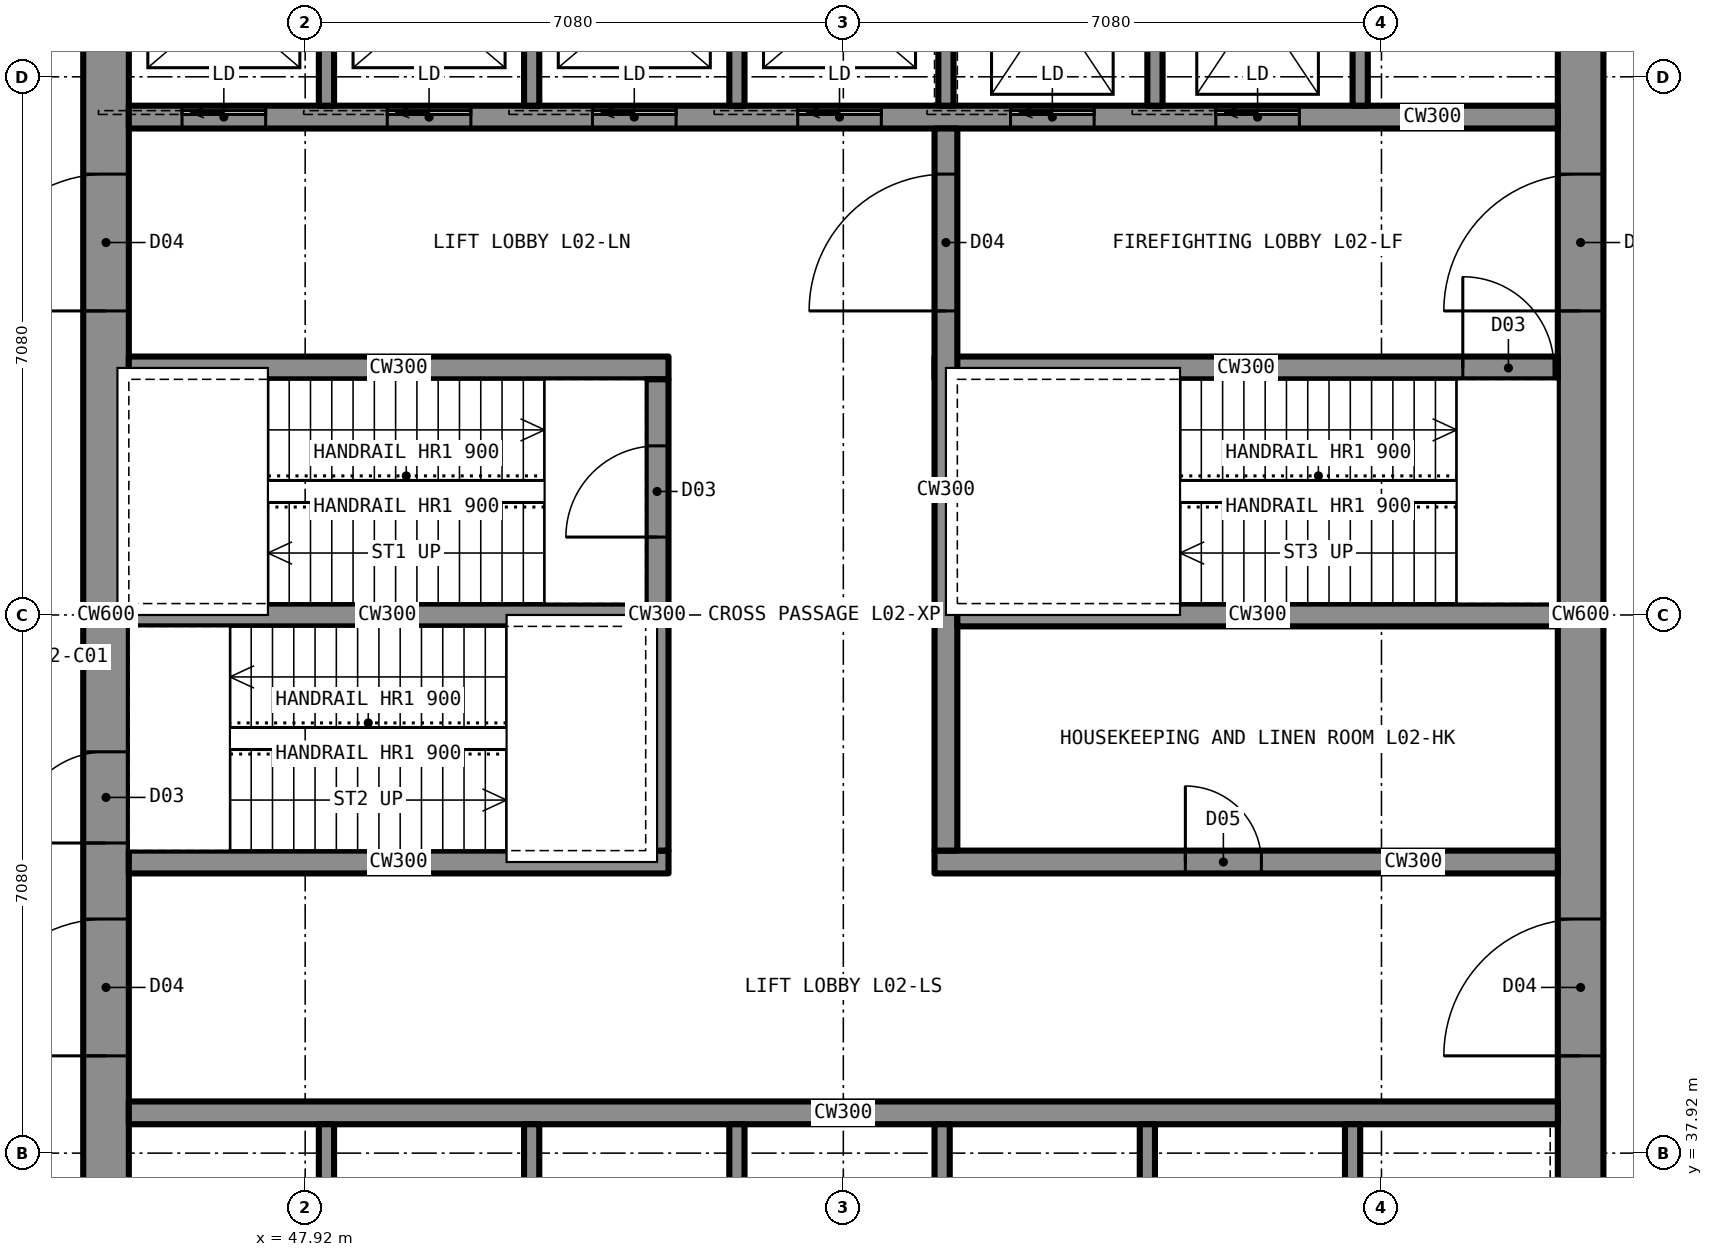
"""IFC4 building model, lengths in metres.
Left out: names, types, materials, properties, quantities, classifications, styles, units other than length and angle.
Written with IfcOpenShell. Run it as: python <this file> out.ifc"""

import sys

from ifc_helpers import new_model, si_unit, direction, frame, frame_2d, origin, place, context, subcontext, project, spatial, rectangle, extrude, element, fill, save


model = new_model("IFC4")
c1 = context("Model", 3, precision=1e-05, world=origin(), true_north=direction((0.0, 1.0)))
c2 = subcontext(c1, "Body", "Model", "MODEL_VIEW")
j1 = project(units=[si_unit("LENGTHUNIT", "METRE"), si_unit("PLANEANGLEUNIT", "RADIAN")], contexts=[c1])
p1 = place(None, origin())
s1 = spatial("IfcSite", under=j1, at=p1, CompositionType="ELEMENT")
p2 = place(p1, origin())
s2 = spatial("IfcBuilding", under=s1, at=p2, CompositionType="ELEMENT")
p3 = place(p2, frame((0.0, 0.0, 11.0)))
s3 = spatial("IfcBuildingStorey", under=s2, at=p3, CompositionType="ELEMENT", Elevation=11.0)
p4 = place(p3, frame((64.7, 35.6, 0.0), z_axis=(0.0, 0.0, 1.0), x_axis=(0.0, 1.0, 0.0)))
e1 = element("IfcWall", 1, at=p4, inside=s3, PredefinedType="SHEAR", context=c2, shape_type="SweptSolid", body=[
    extrude(rectangle(XDim=18.8, YDim=0.6, at=frame_2d((9.4, 0.0))), origin(), (0.0, 0.0, 1.0), 5.0),
])
p5 = place(p4, frame((13.4, 0.0, 0.0)))
e2 = element("IfcOpeningElement", 2, at=p5, cuts=e1, PredefinedType="OPENING", context=c2, shape_type="SweptSolid", body=[
    extrude(rectangle(XDim=1.8, YDim=2.2, at=frame_2d((0.9, 1.1))), frame((0.0, 0.31, 0.0), z_axis=(0.0, -1.0, 0.0), x_axis=(1.0, 0.0, 0.0)), (0.0, 0.0, 1.0), 0.62),
])
p6 = place(p4, frame((3.6, 0.0, 0.0)))
e3 = element("IfcOpeningElement", 3, at=p6, cuts=e1, PredefinedType="OPENING", context=c2, shape_type="SweptSolid", body=[
    extrude(rectangle(XDim=1.8, YDim=2.2, at=frame_2d((0.9, 1.1))), frame((0.0, 0.31, 0.0), z_axis=(0.0, -1.0, 0.0), x_axis=(1.0, 0.0, 0.0)), (0.0, 0.0, 1.0), 0.62),
])
p7 = place(p3, frame((45.3, 35.6, 0.0), z_axis=(0.0, 0.0, 1.0), x_axis=(0.0, 1.0, 0.0)))
e4 = element("IfcWall", 4, at=p7, inside=s3, PredefinedType="SHEAR", context=c2, shape_type="SweptSolid", body=[
    extrude(rectangle(XDim=18.8, YDim=0.6, at=frame_2d((9.4, 0.0))), origin(), (0.0, 0.0, 1.0), 5.0),
])
p8 = place(p7, frame((13.4, 0.0, 0.0)))
e5 = element("IfcOpeningElement", 5, at=p8, cuts=e4, PredefinedType="OPENING", context=c2, shape_type="SweptSolid", body=[
    extrude(rectangle(XDim=1.8, YDim=2.2, at=frame_2d((0.9, 1.1))), frame((0.0, 0.31, 0.0), z_axis=(0.0, -1.0, 0.0), x_axis=(1.0, 0.0, 0.0)), (0.0, 0.0, 1.0), 0.62),
])
p9 = place(p7, frame((3.6, 0.0, 0.0)))
e6 = element("IfcOpeningElement", 6, at=p9, cuts=e4, PredefinedType="OPENING", context=c2, shape_type="SweptSolid", body=[
    extrude(rectangle(XDim=1.8, YDim=2.2, at=frame_2d((0.9, 1.1))), frame((0.0, 0.31, 0.0), z_axis=(0.0, -1.0, 0.0), x_axis=(1.0, 0.0, 0.0)), (0.0, 0.0, 1.0), 0.62),
])
p10 = place(p7, frame((6.4, 0.0, 0.0)))
e7 = element("IfcOpeningElement", 7, at=p10, cuts=e4, PredefinedType="OPENING", context=c2, shape_type="SweptSolid", body=[
    extrude(rectangle(XDim=1.2, YDim=2.2, at=frame_2d((0.6, 1.1))), frame((0.0, 0.31, 0.0), z_axis=(0.0, -1.0, 0.0), x_axis=(1.0, 0.0, 0.0)), (0.0, 0.0, 1.0), 0.62),
])
p11 = place(p3, frame((45.6, 51.55, 0.0), z_axis=(0.0, 0.0, 1.0), x_axis=(1.0, 0.0, 0.0)))
e8 = element("IfcWall", 8, at=p11, inside=s3, PredefinedType="SHEAR", context=c2, shape_type="SweptSolid", body=[
    extrude(rectangle(XDim=18.8, YDim=0.3, at=frame_2d((9.4, 0.0))), origin(), (0.0, 0.0, 1.0), 5.0),
])
p12 = place(p11, frame((0.7, 0.0, 0.0)))
e9 = element("IfcOpeningElement", 9, at=p12, cuts=e8, PredefinedType="OPENING", context=c2, shape_type="SweptSolid", body=[
    extrude(rectangle(XDim=1.1, YDim=2.2, at=frame_2d((0.55, 1.1))), frame((0.0, 0.16, 0.0), z_axis=(0.0, -1.0, 0.0), x_axis=(1.0, 0.0, 0.0)), (0.0, 0.0, 1.0), 0.32),
])
p13 = place(p11, frame((3.4, 0.0, 0.0)))
e10 = element("IfcOpeningElement", 10, at=p13, cuts=e8, PredefinedType="OPENING", context=c2, shape_type="SweptSolid", body=[
    extrude(rectangle(XDim=1.1, YDim=2.2, at=frame_2d((0.55, 1.1))), frame((0.0, 0.16, 0.0), z_axis=(0.0, -1.0, 0.0), x_axis=(1.0, 0.0, 0.0)), (0.0, 0.0, 1.0), 0.32),
])
p14 = place(p11, frame((6.1, 0.0, 0.0)))
e11 = element("IfcOpeningElement", 11, at=p14, cuts=e8, PredefinedType="OPENING", context=c2, shape_type="SweptSolid", body=[
    extrude(rectangle(XDim=1.1, YDim=2.2, at=frame_2d((0.55, 1.1))), frame((0.0, 0.16, 0.0), z_axis=(0.0, -1.0, 0.0), x_axis=(1.0, 0.0, 0.0)), (0.0, 0.0, 1.0), 0.32),
])
p15 = place(p11, frame((8.8, 0.0, 0.0)))
e12 = element("IfcOpeningElement", 12, at=p15, cuts=e8, PredefinedType="OPENING", context=c2, shape_type="SweptSolid", body=[
    extrude(rectangle(XDim=1.1, YDim=2.2, at=frame_2d((0.55, 1.1))), frame((0.0, 0.16, 0.0), z_axis=(0.0, -1.0, 0.0), x_axis=(1.0, 0.0, 0.0)), (0.0, 0.0, 1.0), 0.32),
])
p16 = place(p11, frame((11.6, 0.0, 0.0)))
e13 = element("IfcOpeningElement", 13, at=p16, cuts=e8, PredefinedType="OPENING", context=c2, shape_type="SweptSolid", body=[
    extrude(rectangle(XDim=1.1, YDim=2.2, at=frame_2d((0.55, 1.1))), frame((0.0, 0.16, 0.0), z_axis=(0.0, -1.0, 0.0), x_axis=(1.0, 0.0, 0.0)), (0.0, 0.0, 1.0), 0.32),
])
p17 = place(p11, frame((14.3, 0.0, 0.0)))
e14 = element("IfcOpeningElement", 14, at=p17, cuts=e8, PredefinedType="OPENING", context=c2, shape_type="SweptSolid", body=[
    extrude(rectangle(XDim=1.1, YDim=2.2, at=frame_2d((0.55, 1.1))), frame((0.0, 0.16, 0.0), z_axis=(0.0, -1.0, 0.0), x_axis=(1.0, 0.0, 0.0)), (0.0, 0.0, 1.0), 0.32),
])
p18 = place(p3, frame((45.6, 38.45, 0.0), z_axis=(0.0, 0.0, 1.0), x_axis=(1.0, 0.0, 0.0)))
e15 = element("IfcWall", 15, at=p18, inside=s3, PredefinedType="SHEAR", context=c2, shape_type="SweptSolid", body=[
    extrude(rectangle(XDim=18.8, YDim=0.3, at=frame_2d((9.4, 0.0))), origin(), (0.0, 0.0, 1.0), 5.0),
])
p19 = place(p3, frame((45.6, 48.25, 0.0), z_axis=(0.0, 0.0, 1.0), x_axis=(1.0, 0.0, 0.0)))
e16 = element("IfcWall", 16, at=p19, inside=s3, PredefinedType="SHEAR", context=c2, shape_type="SweptSolid", body=[
    extrude(rectangle(XDim=7.1, YDim=0.3, at=frame_2d((3.55, 0.0))), origin(), (0.0, 0.0, 1.0), 5.0),
])
p20 = place(p3, frame((56.2, 48.25, 0.0), z_axis=(0.0, 0.0, 1.0), x_axis=(1.0, 0.0, 0.0)))
e17 = element("IfcWall", 17, at=p20, inside=s3, PredefinedType="SHEAR", context=c2, shape_type="SweptSolid", body=[
    extrude(rectangle(XDim=8.2, YDim=0.3, at=frame_2d((4.1, 0.0))), origin(), (0.0, 0.0, 1.0), 5.0),
])
p21 = place(p20, frame((6.95, 0.0, 0.0)))
e18 = element("IfcOpeningElement", 18, at=p21, cuts=e17, PredefinedType="OPENING", context=c2, shape_type="SweptSolid", body=[
    extrude(rectangle(XDim=1.2, YDim=2.2, at=frame_2d((0.6, 1.1))), frame((0.0, 0.16, 0.0), z_axis=(0.0, -1.0, 0.0), x_axis=(1.0, 0.0, 0.0)), (0.0, 0.0, 1.0), 0.32),
])
p22 = place(p3, frame((45.6, 41.75, 0.0), z_axis=(0.0, 0.0, 1.0), x_axis=(1.0, 0.0, 0.0)))
e19 = element("IfcWall", 19, at=p22, inside=s3, PredefinedType="SHEAR", context=c2, shape_type="SweptSolid", body=[
    extrude(rectangle(XDim=7.1, YDim=0.3, at=frame_2d((3.55, 0.0))), origin(), (0.0, 0.0, 1.0), 5.0),
])
p23 = place(p3, frame((56.2, 41.75, 0.0), z_axis=(0.0, 0.0, 1.0), x_axis=(1.0, 0.0, 0.0)))
e20 = element("IfcWall", 20, at=p23, inside=s3, PredefinedType="SHEAR", context=c2, shape_type="SweptSolid", body=[
    extrude(rectangle(XDim=8.2, YDim=0.3, at=frame_2d((4.1, 0.0))), origin(), (0.0, 0.0, 1.0), 5.0),
])
p24 = place(p23, frame((3.3, 0.0, 0.0)))
e21 = element("IfcOpeningElement", 21, at=p24, cuts=e20, PredefinedType="OPENING", context=c2, shape_type="SweptSolid", body=[
    extrude(rectangle(XDim=1.0, YDim=2.1, at=frame_2d((0.5, 1.05))), frame((0.0, 0.16, 0.0), z_axis=(0.0, -1.0, 0.0), x_axis=(1.0, 0.0, 0.0)), (0.0, 0.0, 1.0), 0.32),
])
p25 = place(p3, frame((52.55, 41.9, 0.0), z_axis=(0.0, 0.0, 1.0), x_axis=(0.0, 1.0, 0.0)))
e22 = element("IfcWall", 22, at=p25, inside=s3, PredefinedType="SHEAR", context=c2, shape_type="SweptSolid", body=[
    extrude(rectangle(XDim=6.2, YDim=0.3, at=frame_2d((3.1, 0.0))), origin(), (0.0, 0.0, 1.0), 5.0),
])
p26 = place(p25, frame((4.125, 0.0, 0.0)))
e23 = element("IfcOpeningElement", 23, at=p26, cuts=e22, PredefinedType="OPENING", context=c2, shape_type="SweptSolid", body=[
    extrude(rectangle(XDim=1.2, YDim=2.2, at=frame_2d((0.6, 1.1))), frame((0.0, 0.16, 0.0), z_axis=(0.0, -1.0, 0.0), x_axis=(1.0, 0.0, 0.0)), (0.0, 0.0, 1.0), 0.32),
])
p27 = place(p3, frame((56.35, 41.9, 0.0), z_axis=(0.0, 0.0, 1.0), x_axis=(0.0, 1.0, 0.0)))
e24 = element("IfcWall", 24, at=p27, inside=s3, PredefinedType="SHEAR", context=c2, shape_type="SweptSolid", body=[
    extrude(rectangle(XDim=9.5, YDim=0.3, at=frame_2d((4.75, 0.0))), origin(), (0.0, 0.0, 1.0), 5.0),
])
p28 = place(p27, frame((7.1, 0.0, 0.0)))
e25 = element("IfcOpeningElement", 25, at=p28, cuts=e24, PredefinedType="OPENING", context=c2, shape_type="SweptSolid", body=[
    extrude(rectangle(XDim=1.8, YDim=2.2, at=frame_2d((0.9, 1.1))), frame((0.0, 0.16, 0.0), z_axis=(0.0, -1.0, 0.0), x_axis=(1.0, 0.0, 0.0)), (0.0, 0.0, 1.0), 0.32),
])
p29 = place(p3, frame((45.6, 45.0, 0.0), z_axis=(0.0, 0.0, 1.0), x_axis=(1.0, 0.0, 0.0)))
e26 = element("IfcWall", 26, at=p29, inside=s3, PredefinedType="SHEAR", context=c2, shape_type="SweptSolid", body=[
    extrude(rectangle(XDim=6.8, YDim=0.3, at=frame_2d((3.4, 0.0))), origin(), (0.0, 0.0, 1.0), 5.0),
])
p30 = place(p3, frame((56.5, 45.0, 0.0), z_axis=(0.0, 0.0, 1.0), x_axis=(1.0, 0.0, 0.0)))
e27 = element("IfcWall", 27, at=p30, inside=s3, PredefinedType="SHEAR", context=c2, shape_type="SweptSolid", body=[
    extrude(rectangle(XDim=7.9, YDim=0.3, at=frame_2d((3.95, 0.0))), origin(), (0.0, 0.0, 1.0), 5.0),
])
for number, where, z_axis, x_axis in (
    (28, (48.2, 51.7, 0.0), (0.0, 0.0, 1.0), (0.0, 1.0, 0.0)),
    (29, (50.9, 51.7, 0.0), (0.0, 0.0, 1.0), (0.0, 1.0, 0.0)),
    (30, (53.6, 51.7, 0.0), (0.0, 0.0, 1.0), (0.0, 1.0, 0.0)),
    (31, (59.1, 51.7, 0.0), (0.0, 0.0, 1.0), (0.0, 1.0, 0.0)),
    (32, (61.8, 51.7, 0.0), (0.0, 0.0, 1.0), (0.0, 1.0, 0.0)),
    (33, (56.35, 51.7, 0.0), (0.0, 0.0, 1.0), (0.0, 1.0, 0.0)),
    (34, (48.2, 35.6, 0.0), (0.0, 0.0, 1.0), (0.0, 1.0, 0.0)),
    (35, (50.9, 35.6, 0.0), (0.0, 0.0, 1.0), (0.0, 1.0, 0.0)),
    (36, (53.6, 35.6, 0.0), (0.0, 0.0, 1.0), (0.0, 1.0, 0.0)),
    (37, (56.3, 35.6, 0.0), (0.0, 0.0, 1.0), (0.0, 1.0, 0.0)),
    (38, (59.0, 35.6, 0.0), (0.0, 0.0, 1.0), (0.0, 1.0, 0.0)),
    (39, (61.7, 35.6, 0.0), (0.0, 0.0, 1.0), (0.0, 1.0, 0.0)),
):
    element("IfcWall", number, at=place(p3, frame(where, z_axis=z_axis, x_axis=x_axis)), inside=s3, PredefinedType="PARTITIONING", context=c2, shape_type="SweptSolid", body=[
        extrude(rectangle(XDim=2.7, YDim=0.2, at=frame_2d((1.35, 0.0))), origin(), (0.0, 0.0, 1.0), 4.65),
    ])
p31 = place(p8, origin())
e40 = element("IfcDoor", 40, at=p31, inside=s3, OperationType="DOUBLE_DOOR_SINGLE_SWING", PredefinedType="DOOR", context=c2, shape_type="SweptSolid", body=[
    extrude(rectangle(XDim=1.8, YDim=2.2, at=frame_2d((0.9, 1.1))), frame((0.0, 0.025, 0.0), z_axis=(0.0, -1.0, 0.0), x_axis=(1.0, 0.0, 0.0)), (0.0, 0.0, 1.0), 0.05),
])
fill(e5, e40)
p32 = place(p9, origin())
e41 = element("IfcDoor", 41, at=p32, inside=s3, OperationType="DOUBLE_DOOR_SINGLE_SWING", PredefinedType="DOOR", context=c2, shape_type="SweptSolid", body=[
    extrude(rectangle(XDim=1.8, YDim=2.2, at=frame_2d((0.9, 1.1))), frame((0.0, 0.025, 0.0), z_axis=(0.0, -1.0, 0.0), x_axis=(1.0, 0.0, 0.0)), (0.0, 0.0, 1.0), 0.05),
])
fill(e6, e41)
p33 = place(p5, origin())
e42 = element("IfcDoor", 42, at=p33, inside=s3, OperationType="DOUBLE_DOOR_SINGLE_SWING", PredefinedType="DOOR", context=c2, shape_type="SweptSolid", body=[
    extrude(rectangle(XDim=1.8, YDim=2.2, at=frame_2d((0.9, 1.1))), frame((0.0, 0.025, 0.0), z_axis=(0.0, -1.0, 0.0), x_axis=(1.0, 0.0, 0.0)), (0.0, 0.0, 1.0), 0.05),
])
fill(e2, e42)
p34 = place(p6, origin())
e43 = element("IfcDoor", 43, at=p34, inside=s3, OperationType="DOUBLE_DOOR_SINGLE_SWING", PredefinedType="DOOR", context=c2, shape_type="SweptSolid", body=[
    extrude(rectangle(XDim=1.8, YDim=2.2, at=frame_2d((0.9, 1.1))), frame((0.0, 0.025, 0.0), z_axis=(0.0, -1.0, 0.0), x_axis=(1.0, 0.0, 0.0)), (0.0, 0.0, 1.0), 0.05),
])
fill(e3, e43)
p35 = place(p28, origin())
e44 = element("IfcDoor", 44, at=p35, inside=s3, OperationType="DOUBLE_DOOR_SINGLE_SWING", PredefinedType="DOOR", context=c2, shape_type="SweptSolid", body=[
    extrude(rectangle(XDim=1.8, YDim=2.2, at=frame_2d((0.9, 1.1))), frame((0.0, 0.025, 0.0), z_axis=(0.0, -1.0, 0.0), x_axis=(1.0, 0.0, 0.0)), (0.0, 0.0, 1.0), 0.05),
])
fill(e25, e44)
p36 = place(p26, origin())
e45 = element("IfcDoor", 45, at=p36, inside=s3, OperationType="SINGLE_SWING_LEFT", PredefinedType="DOOR", context=c2, shape_type="SweptSolid", body=[
    extrude(rectangle(XDim=1.2, YDim=2.2, at=frame_2d((0.6, 1.1))), frame((0.0, 0.025, 0.0), z_axis=(0.0, -1.0, 0.0), x_axis=(1.0, 0.0, 0.0)), (0.0, 0.0, 1.0), 0.05),
])
fill(e23, e45)
p37 = place(p10, origin())
e46 = element("IfcDoor", 46, at=p37, inside=s3, OperationType="SINGLE_SWING_LEFT", PredefinedType="DOOR", context=c2, shape_type="SweptSolid", body=[
    extrude(rectangle(XDim=1.2, YDim=2.2, at=frame_2d((0.6, 1.1))), frame((0.0, 0.025, 0.0), z_axis=(0.0, -1.0, 0.0), x_axis=(1.0, 0.0, 0.0)), (0.0, 0.0, 1.0), 0.05),
])
fill(e7, e46)
p38 = place(p21, origin())
e47 = element("IfcDoor", 47, at=p38, inside=s3, OperationType="SINGLE_SWING_LEFT", PredefinedType="DOOR", context=c2, shape_type="SweptSolid", body=[
    extrude(rectangle(XDim=1.2, YDim=2.2, at=frame_2d((0.6, 1.1))), frame((0.0, 0.025, 0.0), z_axis=(0.0, -1.0, 0.0), x_axis=(1.0, 0.0, 0.0)), (0.0, 0.0, 1.0), 0.05),
])
fill(e18, e47)
p39 = place(p24, origin())
e48 = element("IfcDoor", 48, at=p39, inside=s3, OperationType="SINGLE_SWING_LEFT", PredefinedType="DOOR", context=c2, shape_type="SweptSolid", body=[
    extrude(rectangle(XDim=1.0, YDim=2.1, at=frame_2d((0.5, 1.05))), frame((0.0, 0.025, 0.0), z_axis=(0.0, -1.0, 0.0), x_axis=(1.0, 0.0, 0.0)), (0.0, 0.0, 1.0), 0.05),
])
fill(e21, e48)
p40 = place(p12, origin())
e49 = element("IfcDoor", 49, at=p40, inside=s3, OperationType="SLIDING_TO_LEFT", PredefinedType="DOOR", context=c2, shape_type="SweptSolid", body=[
    extrude(rectangle(XDim=1.1, YDim=2.2, at=frame_2d((0.55, 1.1))), frame((0.0, 0.025, 0.0), z_axis=(0.0, -1.0, 0.0), x_axis=(1.0, 0.0, 0.0)), (0.0, 0.0, 1.0), 0.05),
])
fill(e9, e49)
p41 = place(p13, origin())
e50 = element("IfcDoor", 50, at=p41, inside=s3, OperationType="SLIDING_TO_LEFT", PredefinedType="DOOR", context=c2, shape_type="SweptSolid", body=[
    extrude(rectangle(XDim=1.1, YDim=2.2, at=frame_2d((0.55, 1.1))), frame((0.0, 0.025, 0.0), z_axis=(0.0, -1.0, 0.0), x_axis=(1.0, 0.0, 0.0)), (0.0, 0.0, 1.0), 0.05),
])
fill(e10, e50)
p42 = place(p14, origin())
e51 = element("IfcDoor", 51, at=p42, inside=s3, OperationType="SLIDING_TO_LEFT", PredefinedType="DOOR", context=c2, shape_type="SweptSolid", body=[
    extrude(rectangle(XDim=1.1, YDim=2.2, at=frame_2d((0.55, 1.1))), frame((0.0, 0.025, 0.0), z_axis=(0.0, -1.0, 0.0), x_axis=(1.0, 0.0, 0.0)), (0.0, 0.0, 1.0), 0.05),
])
fill(e11, e51)
p43 = place(p15, origin())
e52 = element("IfcDoor", 52, at=p43, inside=s3, OperationType="SLIDING_TO_LEFT", PredefinedType="DOOR", context=c2, shape_type="SweptSolid", body=[
    extrude(rectangle(XDim=1.1, YDim=2.2, at=frame_2d((0.55, 1.1))), frame((0.0, 0.025, 0.0), z_axis=(0.0, -1.0, 0.0), x_axis=(1.0, 0.0, 0.0)), (0.0, 0.0, 1.0), 0.05),
])
fill(e12, e52)
p44 = place(p16, origin())
e53 = element("IfcDoor", 53, at=p44, inside=s3, OperationType="SLIDING_TO_LEFT", PredefinedType="DOOR", context=c2, shape_type="SweptSolid", body=[
    extrude(rectangle(XDim=1.1, YDim=2.2, at=frame_2d((0.55, 1.1))), frame((0.0, 0.025, 0.0), z_axis=(0.0, -1.0, 0.0), x_axis=(1.0, 0.0, 0.0)), (0.0, 0.0, 1.0), 0.05),
])
fill(e13, e53)
p45 = place(p17, origin())
e54 = element("IfcDoor", 54, at=p45, inside=s3, OperationType="SLIDING_TO_LEFT", PredefinedType="DOOR", context=c2, shape_type="SweptSolid", body=[
    extrude(rectangle(XDim=1.1, YDim=2.2, at=frame_2d((0.55, 1.1))), frame((0.0, 0.025, 0.0), z_axis=(0.0, -1.0, 0.0), x_axis=(1.0, 0.0, 0.0)), (0.0, 0.0, 1.0), 0.05),
])
fill(e14, e54)
save(model, sys.argv[1])
